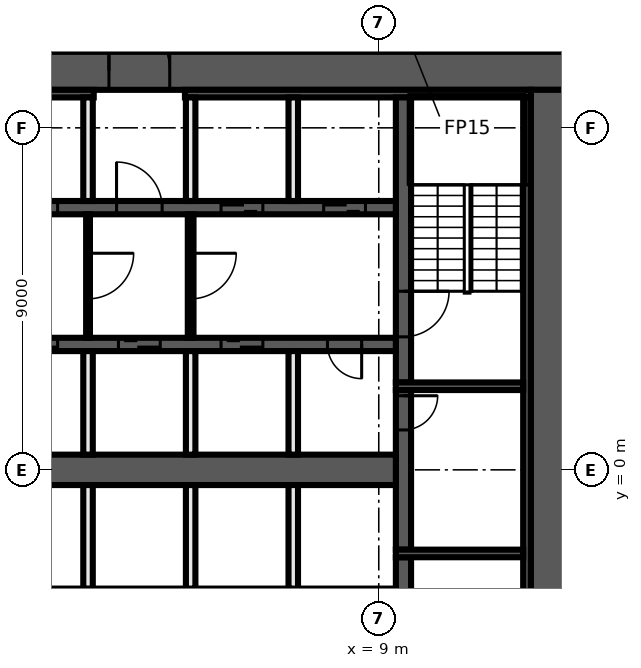
"""IFC4 building model, lengths in metres.
Left out: names, types, materials, properties, quantities, classifications, styles, units other than length and angle.
Written with IfcOpenShell. Run it as: python <this file> out.ifc"""

import sys

from ifc_helpers import new_model, si_unit, direction, frame, frame_2d, origin, place, context, subcontext, project, spatial, rectangle, extrude, element, fill, save


model = new_model("IFC4")
c1 = context("Model", 3, precision=1e-05, world=origin(), true_north=direction((0.0, 1.0)))
c2 = subcontext(c1, "Body", "Model", "MODEL_VIEW")
j1 = project(units=[si_unit("LENGTHUNIT", "METRE"), si_unit("PLANEANGLEUNIT", "RADIAN")], contexts=[c1])
p1 = place(None, origin())
s1 = spatial("IfcSite", under=j1, at=p1, CompositionType="ELEMENT")
p2 = place(p1, origin())
s2 = spatial("IfcBuilding", under=s1, at=p2, CompositionType="ELEMENT")
p3 = place(p2, frame((0.0, 0.0, 117.4)))
s3 = spatial("IfcBuildingStorey", under=s2, at=p3, CompositionType="ELEMENT", Elevation=117.4)
for number, where, z_axis, x_axis in (
    (1, (3.6, 11.0, 0.0), (0.0, 0.0, 1.0), (0.0, 1.0, 0.0)),
    (2, (1.8, 11.0, 0.0), (0.0, 0.0, 1.0), (0.0, 1.0, 0.0)),
):
    element("IfcWall", number, at=place(p3, frame(where, z_axis=z_axis, x_axis=x_axis)), inside=s3, PredefinedType="PARTITIONING", context=c2, shape_type="SweptSolid", body=[
        extrude(rectangle(XDim=1.175, YDim=0.15, at=frame_2d((0.587, 0.0))), origin(), (0.0, 0.0, 1.0), 3.3),
    ])
p4 = place(p3, frame((-14.0, 10.5, 0.0), z_axis=(0.0, 0.0, 1.0), x_axis=(1.0, 0.0, 0.0)))
e3 = element("IfcWall", 3, at=p4, inside=s3, PredefinedType="SHEAR", context=c2, shape_type="SweptSolid", body=[
    extrude(rectangle(XDim=28.0, YDim=1.0, at=frame_2d((14.0, 0.0))), origin(), (0.0, 0.0, 1.0), 3.3),
])
p5 = place(p4, frame((15.9, 0.0, 0.0)))
e4 = element("IfcOpeningElement", 4, at=p5, cuts=e3, PredefinedType="OPENING", context=c2, shape_type="SweptSolid", body=[
    extrude(rectangle(XDim=1.6, YDim=2.1, at=frame_2d((0.8, 1.05))), frame((0.0, 0.51, 0.0), z_axis=(0.0, -1.0, 0.0), x_axis=(1.0, 0.0, 0.0)), (0.0, 0.0, 1.0), 1.02),
])
p6 = place(p3, frame((13.5, 10.0, 0.0), z_axis=(0.0, 0.0, 1.0), x_axis=(0.0, -1.0, 0.0)))
e5 = element("IfcWall", 5, at=p6, inside=s3, PredefinedType="SHEAR", context=c2, shape_type="SweptSolid", body=[
    extrude(rectangle(XDim=20.0, YDim=1.0, at=frame_2d((10.0, 0.0))), origin(), (0.0, 0.0, 1.0), 3.3),
])
p7 = place(p3, frame((-13.0, 9.9, 0.0), z_axis=(0.0, 0.0, 1.0), x_axis=(1.0, 0.0, 0.0)))
e6 = element("IfcWall", 6, at=p7, inside=s3, PredefinedType="SHEAR", context=c2, shape_type="SweptSolid", body=[
    extrude(rectangle(XDim=14.5, YDim=0.2, at=frame_2d((7.25, 0.0))), origin(), (0.0, 0.0, 1.0), 3.3),
])
p8 = place(p3, frame((3.9, 9.9, 0.0), z_axis=(0.0, 0.0, 1.0), x_axis=(1.0, 0.0, 0.0)))
e7 = element("IfcWall", 7, at=p8, inside=s3, PredefinedType="SHEAR", context=c2, shape_type="SweptSolid", body=[
    extrude(rectangle(XDim=9.1, YDim=0.2, at=frame_2d((4.55, 0.0))), origin(), (0.0, 0.0, 1.0), 3.3),
])
p9 = place(p3, frame((12.9, 9.8, 0.0), z_axis=(0.0, 0.0, 1.0), x_axis=(0.0, -1.0, 0.0)))
e8 = element("IfcWall", 8, at=p9, inside=s3, PredefinedType="SHEAR", context=c2, shape_type="SweptSolid", body=[
    extrude(rectangle(XDim=19.6, YDim=0.2, at=frame_2d((9.8, 0.0))), origin(), (0.0, 0.0, 1.0), 3.3),
])
p10 = place(p3, frame((9.65, -2.3, 0.0), z_axis=(0.0, 0.0, 1.0), x_axis=(0.0, -1.0, 0.0)))
e9 = element("IfcWall", 9, at=p10, inside=s3, PredefinedType="SHEAR", context=c2, shape_type="SweptSolid", body=[
    extrude(rectangle(XDim=7.5, YDim=0.4, at=frame_2d((3.75, 0.0))), origin(), (0.0, 0.0, 1.0), 3.3),
])
p11 = place(p10, frame((1.2, 0.0, 0.0)))
e10 = element("IfcOpeningElement", 10, at=p11, cuts=e9, PredefinedType="OPENING", context=c2, shape_type="SweptSolid", body=[
    extrude(rectangle(XDim=1.2, YDim=2.1, at=frame_2d((0.6, 1.05))), frame((0.0, 0.21, 0.0), z_axis=(0.0, -1.0, 0.0), x_axis=(1.0, 0.0, 0.0)), (0.0, 0.0, 1.0), 0.42),
])
p12 = place(p3, frame((9.65, 2.1, 0.0), z_axis=(0.0, 0.0, 1.0), x_axis=(0.0, -1.0, 0.0)))
e11 = element("IfcWall", 11, at=p12, inside=s3, PredefinedType="SHEAR", context=c2, shape_type="SweptSolid", body=[
    extrude(rectangle(XDim=4.2, YDim=0.4, at=frame_2d((2.1, 0.0))), origin(), (0.0, 0.0, 1.0), 3.3),
])
p13 = place(p12, frame((0.15, 0.0, 0.0)))
e12 = element("IfcOpeningElement", 12, at=p13, cuts=e11, PredefinedType="OPENING", context=c2, shape_type="SweptSolid", body=[
    extrude(rectangle(XDim=0.9, YDim=2.1, at=frame_2d((0.45, 1.05))), frame((0.0, 0.21, 0.0), z_axis=(0.0, -1.0, 0.0), x_axis=(1.0, 0.0, 0.0)), (0.0, 0.0, 1.0), 0.42),
])
p14 = place(p3, frame((9.65, 9.8, 0.0), z_axis=(0.0, 0.0, 1.0), x_axis=(0.0, -1.0, 0.0)))
e13 = element("IfcWall", 13, at=p14, inside=s3, PredefinedType="SHEAR", context=c2, shape_type="SweptSolid", body=[
    extrude(rectangle(XDim=7.5, YDim=0.4, at=frame_2d((3.75, 0.0))), origin(), (0.0, 0.0, 1.0), 3.3),
])
p15 = place(p14, frame((5.1, 0.0, 0.0)))
e14 = element("IfcOpeningElement", 14, at=p15, cuts=e13, PredefinedType="OPENING", context=c2, shape_type="SweptSolid", body=[
    extrude(rectangle(XDim=1.2, YDim=2.1, at=frame_2d((0.6, 1.05))), frame((0.0, 0.21, 0.0), z_axis=(0.0, -1.0, 0.0), x_axis=(1.0, 0.0, 0.0)), (0.0, 0.0, 1.0), 0.42),
])
for number, where, z_axis, x_axis in (
    (15, (9.45, 2.2, 0.0), (0.0, 0.0, 1.0), (1.0, 0.0, 0.0)),
    (16, (9.45, -2.2, 0.0), (0.0, 0.0, 1.0), (1.0, 0.0, 0.0)),
):
    element("IfcWall", number, at=place(p3, frame(where, z_axis=z_axis, x_axis=x_axis)), inside=s3, PredefinedType="SHEAR", context=c2, shape_type="SweptSolid", body=[
        extrude(rectangle(XDim=3.35, YDim=0.2, at=frame_2d((1.675, 0.0))), origin(), (0.0, 0.0, 1.0), 3.3),
    ])
p16 = place(p3, frame((-9.45, 6.9, 0.0), z_axis=(0.0, 0.0, 1.0), x_axis=(1.0, 0.0, 0.0)))
e17 = element("IfcWall", 17, at=p16, inside=s3, PredefinedType="SHEAR", context=c2, shape_type="SweptSolid", body=[
    extrude(rectangle(XDim=18.9, YDim=0.35, at=frame_2d((9.45, 0.0))), origin(), (0.0, 0.0, 1.0), 3.3),
])
p17 = place(p16, frame((0.8, 0.0, 0.0)))
e18 = element("IfcOpeningElement", 18, at=p17, cuts=e17, PredefinedType="OPENING", context=c2, shape_type="SweptSolid", body=[
    extrude(rectangle(XDim=1.1, YDim=2.1, at=frame_2d((0.55, 1.05))), frame((0.0, 0.185, 0.0), z_axis=(0.0, -1.0, 0.0), x_axis=(1.0, 0.0, 0.0)), (0.0, 0.0, 1.0), 0.37),
])
p18 = place(p16, frame((3.5, 0.0, 0.0)))
e19 = element("IfcOpeningElement", 19, at=p18, cuts=e17, PredefinedType="OPENING", context=c2, shape_type="SweptSolid", body=[
    extrude(rectangle(XDim=1.1, YDim=2.1, at=frame_2d((0.55, 1.05))), frame((0.0, 0.185, 0.0), z_axis=(0.0, -1.0, 0.0), x_axis=(1.0, 0.0, 0.0)), (0.0, 0.0, 1.0), 0.37),
])
p19 = place(p16, frame((6.2, 0.0, 0.0)))
e20 = element("IfcOpeningElement", 20, at=p19, cuts=e17, PredefinedType="OPENING", context=c2, shape_type="SweptSolid", body=[
    extrude(rectangle(XDim=1.1, YDim=2.1, at=frame_2d((0.55, 1.05))), frame((0.0, 0.185, 0.0), z_axis=(0.0, -1.0, 0.0), x_axis=(1.0, 0.0, 0.0)), (0.0, 0.0, 1.0), 0.37),
])
p20 = place(p16, frame((8.9, 0.0, 0.0)))
e21 = element("IfcOpeningElement", 21, at=p20, cuts=e17, PredefinedType="OPENING", context=c2, shape_type="SweptSolid", body=[
    extrude(rectangle(XDim=1.1, YDim=2.1, at=frame_2d((0.55, 1.05))), frame((0.0, 0.185, 0.0), z_axis=(0.0, -1.0, 0.0), x_axis=(1.0, 0.0, 0.0)), (0.0, 0.0, 1.0), 0.37),
])
p21 = place(p16, frame((11.55, 0.0, 0.0)))
e22 = element("IfcOpeningElement", 22, at=p21, cuts=e17, PredefinedType="OPENING", context=c2, shape_type="SweptSolid", body=[
    extrude(rectangle(XDim=1.2, YDim=2.1, at=frame_2d((0.6, 1.05))), frame((0.0, 0.185, 0.0), z_axis=(0.0, -1.0, 0.0), x_axis=(1.0, 0.0, 0.0)), (0.0, 0.0, 1.0), 0.37),
])
p22 = place(p16, frame((14.3, 0.0, 0.0)))
e23 = element("IfcOpeningElement", 23, at=p22, cuts=e17, PredefinedType="OPENING", context=c2, shape_type="SweptSolid", body=[
    extrude(rectangle(XDim=1.1, YDim=2.1, at=frame_2d((0.55, 1.05))), frame((0.0, 0.185, 0.0), z_axis=(0.0, -1.0, 0.0), x_axis=(1.0, 0.0, 0.0)), (0.0, 0.0, 1.0), 0.37),
])
p23 = place(p16, frame((17.0, 0.0, 0.0)))
e24 = element("IfcOpeningElement", 24, at=p23, cuts=e17, PredefinedType="OPENING", context=c2, shape_type="SweptSolid", body=[
    extrude(rectangle(XDim=1.1, YDim=2.1, at=frame_2d((0.55, 1.05))), frame((0.0, 0.185, 0.0), z_axis=(0.0, -1.0, 0.0), x_axis=(1.0, 0.0, 0.0)), (0.0, 0.0, 1.0), 0.37),
])
p24 = place(p3, frame((9.45, 3.3, 0.0), z_axis=(0.0, 0.0, 1.0), x_axis=(-1.0, 0.0, 0.0)))
e25 = element("IfcWall", 25, at=p24, inside=s3, PredefinedType="SHEAR", context=c2, shape_type="SweptSolid", body=[
    extrude(rectangle(XDim=18.9, YDim=0.35, at=frame_2d((9.45, 0.0))), origin(), (0.0, 0.0, 1.0), 3.3),
])
p25 = place(p24, frame((17.0, 0.0, 0.0)))
e26 = element("IfcOpeningElement", 26, at=p25, cuts=e25, PredefinedType="OPENING", context=c2, shape_type="SweptSolid", body=[
    extrude(rectangle(XDim=1.1, YDim=2.1, at=frame_2d((0.55, 1.05))), frame((0.0, 0.185, 0.0), z_axis=(0.0, -1.0, 0.0), x_axis=(1.0, 0.0, 0.0)), (0.0, 0.0, 1.0), 0.37),
])
p26 = place(p24, frame((14.3, 0.0, 0.0)))
e27 = element("IfcOpeningElement", 27, at=p26, cuts=e25, PredefinedType="OPENING", context=c2, shape_type="SweptSolid", body=[
    extrude(rectangle(XDim=1.1, YDim=2.1, at=frame_2d((0.55, 1.05))), frame((0.0, 0.185, 0.0), z_axis=(0.0, -1.0, 0.0), x_axis=(1.0, 0.0, 0.0)), (0.0, 0.0, 1.0), 0.37),
])
p27 = place(p24, frame((11.6, 0.0, 0.0)))
e28 = element("IfcOpeningElement", 28, at=p27, cuts=e25, PredefinedType="OPENING", context=c2, shape_type="SweptSolid", body=[
    extrude(rectangle(XDim=1.1, YDim=2.1, at=frame_2d((0.55, 1.05))), frame((0.0, 0.185, 0.0), z_axis=(0.0, -1.0, 0.0), x_axis=(1.0, 0.0, 0.0)), (0.0, 0.0, 1.0), 0.37),
])
p28 = place(p24, frame((8.9, 0.0, 0.0)))
e29 = element("IfcOpeningElement", 29, at=p28, cuts=e25, PredefinedType="OPENING", context=c2, shape_type="SweptSolid", body=[
    extrude(rectangle(XDim=1.1, YDim=2.1, at=frame_2d((0.55, 1.05))), frame((0.0, 0.185, 0.0), z_axis=(0.0, -1.0, 0.0), x_axis=(1.0, 0.0, 0.0)), (0.0, 0.0, 1.0), 0.37),
])
p29 = place(p24, frame((6.2, 0.0, 0.0)))
e30 = element("IfcOpeningElement", 30, at=p29, cuts=e25, PredefinedType="OPENING", context=c2, shape_type="SweptSolid", body=[
    extrude(rectangle(XDim=1.1, YDim=2.1, at=frame_2d((0.55, 1.05))), frame((0.0, 0.185, 0.0), z_axis=(0.0, -1.0, 0.0), x_axis=(1.0, 0.0, 0.0)), (0.0, 0.0, 1.0), 0.37),
])
p30 = place(p24, frame((3.5, 0.0, 0.0)))
e31 = element("IfcOpeningElement", 31, at=p30, cuts=e25, PredefinedType="OPENING", context=c2, shape_type="SweptSolid", body=[
    extrude(rectangle(XDim=1.1, YDim=2.1, at=frame_2d((0.55, 1.05))), frame((0.0, 0.185, 0.0), z_axis=(0.0, -1.0, 0.0), x_axis=(1.0, 0.0, 0.0)), (0.0, 0.0, 1.0), 0.37),
])
p31 = place(p24, frame((0.9, 0.0, 0.0)))
e32 = element("IfcOpeningElement", 32, at=p31, cuts=e25, PredefinedType="OPENING", context=c2, shape_type="SweptSolid", body=[
    extrude(rectangle(XDim=0.9, YDim=2.1, at=frame_2d((0.45, 1.05))), frame((0.0, 0.185, 0.0), z_axis=(0.0, -1.0, 0.0), x_axis=(1.0, 0.0, 0.0)), (0.0, 0.0, 1.0), 0.37),
])
p32 = place(p3, frame((-9.45, 0.0, 0.0), z_axis=(0.0, 0.0, 1.0), x_axis=(1.0, 0.0, 0.0)))
e33 = element("IfcWall", 33, at=p32, inside=s3, PredefinedType="SHEAR", context=c2, shape_type="SweptSolid", body=[
    extrude(rectangle(XDim=18.9, YDim=0.8, at=frame_2d((9.45, 0.0))), origin(), (0.0, 0.0, 1.0), 3.3),
])
for number, where, z_axis, x_axis in (
    (34, (6.75, -3.125, 0.0), (0.0, 0.0, 1.0), (0.0, 1.0, 0.0)),
    (35, (6.75, 0.4, 0.0), (0.0, 0.0, 1.0), (0.0, 1.0, 0.0)),
    (36, (6.75, 7.075, 0.0), (0.0, 0.0, 1.0), (0.0, 1.0, 0.0)),
):
    element("IfcWall", number, at=place(p3, frame(where, z_axis=z_axis, x_axis=x_axis)), inside=s3, PredefinedType="SOLIDWALL", context=c2, shape_type="SweptSolid", body=[
        extrude(rectangle(XDim=2.725, YDim=0.25, at=frame_2d((1.363, 0.0))), origin(), (0.0, 0.0, 1.0), 3.3),
    ])
p33 = place(p3, frame((4.05, 6.725, 0.0), z_axis=(0.0, 0.0, 1.0), x_axis=(0.0, -1.0, 0.0)))
e37 = element("IfcWall", 37, at=p33, inside=s3, PredefinedType="PARTITIONING", context=c2, shape_type="SweptSolid", body=[
    extrude(rectangle(XDim=3.25, YDim=0.15, at=frame_2d((1.625, 0.0))), origin(), (0.0, 0.0, 1.0), 3.3),
])
p34 = place(p33, frame((1.025, 0.0, 0.0)))
e38 = element("IfcOpeningElement", 38, at=p34, cuts=e37, PredefinedType="OPENING", context=c2, shape_type="SweptSolid", body=[
    extrude(rectangle(XDim=1.2, YDim=2.1, at=frame_2d((0.6, 1.05))), frame((0.0, 0.085, 0.0), z_axis=(0.0, -1.0, 0.0), x_axis=(1.0, 0.0, 0.0)), (0.0, 0.0, 1.0), 0.17),
])
for number, where, z_axis, x_axis in (
    (39, (4.05, -3.125, 0.0), (0.0, 0.0, 1.0), (0.0, 1.0, 0.0)),
    (40, (4.05, 0.4, 0.0), (0.0, 0.0, 1.0), (0.0, 1.0, 0.0)),
    (41, (4.05, 7.075, 0.0), (0.0, 0.0, 1.0), (0.0, 1.0, 0.0)),
):
    element("IfcWall", number, at=place(p3, frame(where, z_axis=z_axis, x_axis=x_axis)), inside=s3, PredefinedType="SOLIDWALL", context=c2, shape_type="SweptSolid", body=[
        extrude(rectangle(XDim=2.725, YDim=0.25, at=frame_2d((1.363, 0.0))), origin(), (0.0, 0.0, 1.0), 3.3),
    ])
p35 = place(p3, frame((1.35, 6.725, 0.0), z_axis=(0.0, 0.0, 1.0), x_axis=(0.0, -1.0, 0.0)))
e42 = element("IfcWall", 42, at=p35, inside=s3, PredefinedType="PARTITIONING", context=c2, shape_type="SweptSolid", body=[
    extrude(rectangle(XDim=3.25, YDim=0.1, at=frame_2d((1.625, 0.0))), origin(), (0.0, 0.0, 1.0), 3.3),
])
p36 = place(p35, frame((1.025, 0.0, 0.0)))
e43 = element("IfcOpeningElement", 43, at=p36, cuts=e42, PredefinedType="OPENING", context=c2, shape_type="SweptSolid", body=[
    extrude(rectangle(XDim=1.2, YDim=2.1, at=frame_2d((0.6, 1.05))), frame((0.0, 0.06, 0.0), z_axis=(0.0, -1.0, 0.0), x_axis=(1.0, 0.0, 0.0)), (0.0, 0.0, 1.0), 0.12),
])
for number, where, z_axis, x_axis in (
    (44, (1.35, -3.125, 0.0), (0.0, 0.0, 1.0), (0.0, 1.0, 0.0)),
    (45, (1.35, 0.4, 0.0), (0.0, 0.0, 1.0), (0.0, 1.0, 0.0)),
    (46, (1.35, 7.075, 0.0), (0.0, 0.0, 1.0), (0.0, 1.0, 0.0)),
):
    element("IfcWall", number, at=place(p3, frame(where, z_axis=z_axis, x_axis=x_axis)), inside=s3, PredefinedType="SOLIDWALL", context=c2, shape_type="SweptSolid", body=[
        extrude(rectangle(XDim=2.725, YDim=0.25, at=frame_2d((1.363, 0.0))), origin(), (0.0, 0.0, 1.0), 3.3),
    ])
p37 = place(p13, origin())
e47 = element("IfcDoor", 47, at=p37, inside=s3, OperationType="SINGLE_SWING_RIGHT", PredefinedType="DOOR", context=c2, shape_type="SweptSolid", body=[
    extrude(rectangle(XDim=0.9, YDim=2.1, at=frame_2d((0.45, 1.05))), frame((0.0, 0.025, 0.0), z_axis=(0.0, -1.0, 0.0), x_axis=(1.0, 0.0, 0.0)), (0.0, 0.0, 1.0), 0.05),
])
fill(e12, e47)
p38 = place(p20, origin())
e48 = element("IfcDoor", 48, at=p38, inside=s3, OperationType="DOUBLE_DOOR_SLIDING", PredefinedType="DOOR", context=c2, shape_type="SweptSolid", body=[
    extrude(rectangle(XDim=1.1, YDim=2.1, at=frame_2d((0.55, 1.05))), frame((0.0, 0.025, 0.0), z_axis=(0.0, -1.0, 0.0), x_axis=(1.0, 0.0, 0.0)), (0.0, 0.0, 1.0), 0.05),
])
fill(e21, e48)
p39 = place(p5, origin())
e49 = element("IfcDoor", 49, at=p39, inside=s3, OperationType="DOUBLE_DOOR_SINGLE_SWING", PredefinedType="DOOR", context=c2, shape_type="SweptSolid", body=[
    extrude(rectangle(XDim=1.6, YDim=2.1, at=frame_2d((0.8, 1.05))), frame((0.0, 0.025, 0.0), z_axis=(0.0, -1.0, 0.0), x_axis=(1.0, 0.0, 0.0)), (0.0, 0.0, 1.0), 0.05),
])
fill(e4, e49)
p40 = place(p21, origin())
e50 = element("IfcDoor", 50, at=p40, inside=s3, OperationType="SINGLE_SWING_LEFT", PredefinedType="DOOR", context=c2, shape_type="SweptSolid", body=[
    extrude(rectangle(XDim=1.2, YDim=2.1, at=frame_2d((0.6, 1.05))), frame((0.0, 0.025, 0.0), z_axis=(0.0, -1.0, 0.0), x_axis=(1.0, 0.0, 0.0)), (0.0, 0.0, 1.0), 0.05),
])
fill(e22, e50)
p41 = place(p22, origin())
e51 = element("IfcDoor", 51, at=p41, inside=s3, OperationType="DOUBLE_DOOR_SLIDING", PredefinedType="DOOR", context=c2, shape_type="SweptSolid", body=[
    extrude(rectangle(XDim=1.1, YDim=2.1, at=frame_2d((0.55, 1.05))), frame((0.0, 0.025, 0.0), z_axis=(0.0, -1.0, 0.0), x_axis=(1.0, 0.0, 0.0)), (0.0, 0.0, 1.0), 0.05),
])
fill(e23, e51)
p42 = place(p23, origin())
e52 = element("IfcDoor", 52, at=p42, inside=s3, OperationType="DOUBLE_DOOR_SLIDING", PredefinedType="DOOR", context=c2, shape_type="SweptSolid", body=[
    extrude(rectangle(XDim=1.1, YDim=2.1, at=frame_2d((0.55, 1.05))), frame((0.0, 0.025, 0.0), z_axis=(0.0, -1.0, 0.0), x_axis=(1.0, 0.0, 0.0)), (0.0, 0.0, 1.0), 0.05),
])
fill(e24, e52)
p43 = place(p28, origin())
e53 = element("IfcDoor", 53, at=p43, inside=s3, OperationType="DOUBLE_DOOR_SLIDING", PredefinedType="DOOR", context=c2, shape_type="SweptSolid", body=[
    extrude(rectangle(XDim=1.1, YDim=2.1, at=frame_2d((0.55, 1.05))), frame((0.0, 0.025, 0.0), z_axis=(0.0, -1.0, 0.0), x_axis=(1.0, 0.0, 0.0)), (0.0, 0.0, 1.0), 0.05),
])
fill(e29, e53)
p44 = place(p29, origin())
e54 = element("IfcDoor", 54, at=p44, inside=s3, OperationType="DOUBLE_DOOR_SLIDING", PredefinedType="DOOR", context=c2, shape_type="SweptSolid", body=[
    extrude(rectangle(XDim=1.1, YDim=2.1, at=frame_2d((0.55, 1.05))), frame((0.0, 0.025, 0.0), z_axis=(0.0, -1.0, 0.0), x_axis=(1.0, 0.0, 0.0)), (0.0, 0.0, 1.0), 0.05),
])
fill(e30, e54)
p45 = place(p30, origin())
e55 = element("IfcDoor", 55, at=p45, inside=s3, OperationType="DOUBLE_DOOR_SLIDING", PredefinedType="DOOR", context=c2, shape_type="SweptSolid", body=[
    extrude(rectangle(XDim=1.1, YDim=2.1, at=frame_2d((0.55, 1.05))), frame((0.0, 0.025, 0.0), z_axis=(0.0, -1.0, 0.0), x_axis=(1.0, 0.0, 0.0)), (0.0, 0.0, 1.0), 0.05),
])
fill(e31, e55)
p46 = place(p31, origin())
e56 = element("IfcDoor", 56, at=p46, inside=s3, OperationType="SINGLE_SWING_LEFT", PredefinedType="DOOR", context=c2, shape_type="SweptSolid", body=[
    extrude(rectangle(XDim=0.9, YDim=2.1, at=frame_2d((0.45, 1.05))), frame((0.0, 0.025, 0.0), z_axis=(0.0, -1.0, 0.0), x_axis=(1.0, 0.0, 0.0)), (0.0, 0.0, 1.0), 0.05),
])
fill(e32, e56)
p47 = place(p15, origin())
e57 = element("IfcDoor", 57, at=p47, inside=s3, OperationType="SINGLE_SWING_LEFT", PredefinedType="DOOR", context=c2, shape_type="SweptSolid", body=[
    extrude(rectangle(XDim=1.2, YDim=2.1, at=frame_2d((0.6, 1.05))), frame((0.0, 0.025, 0.0), z_axis=(0.0, -1.0, 0.0), x_axis=(1.0, 0.0, 0.0)), (0.0, 0.0, 1.0), 0.05),
])
fill(e14, e57)
p48 = place(p36, origin())
e58 = element("IfcDoor", 58, at=p48, inside=s3, OperationType="SINGLE_SWING_LEFT", PredefinedType="DOOR", context=c2, shape_type="SweptSolid", body=[
    extrude(rectangle(XDim=1.2, YDim=2.1, at=frame_2d((0.6, 1.05))), frame((0.0, 0.025, 0.0), z_axis=(0.0, -1.0, 0.0), x_axis=(1.0, 0.0, 0.0)), (0.0, 0.0, 1.0), 0.05),
])
fill(e43, e58)
p49 = place(p34, origin())
e59 = element("IfcDoor", 59, at=p49, inside=s3, OperationType="SINGLE_SWING_RIGHT", PredefinedType="DOOR", context=c2, shape_type="SweptSolid", body=[
    extrude(rectangle(XDim=1.2, YDim=2.1, at=frame_2d((0.6, 1.05))), frame((0.0, 0.025, 0.0), z_axis=(0.0, -1.0, 0.0), x_axis=(1.0, 0.0, 0.0)), (0.0, 0.0, 1.0), 0.05),
])
fill(e38, e59)
save(model, sys.argv[1])
